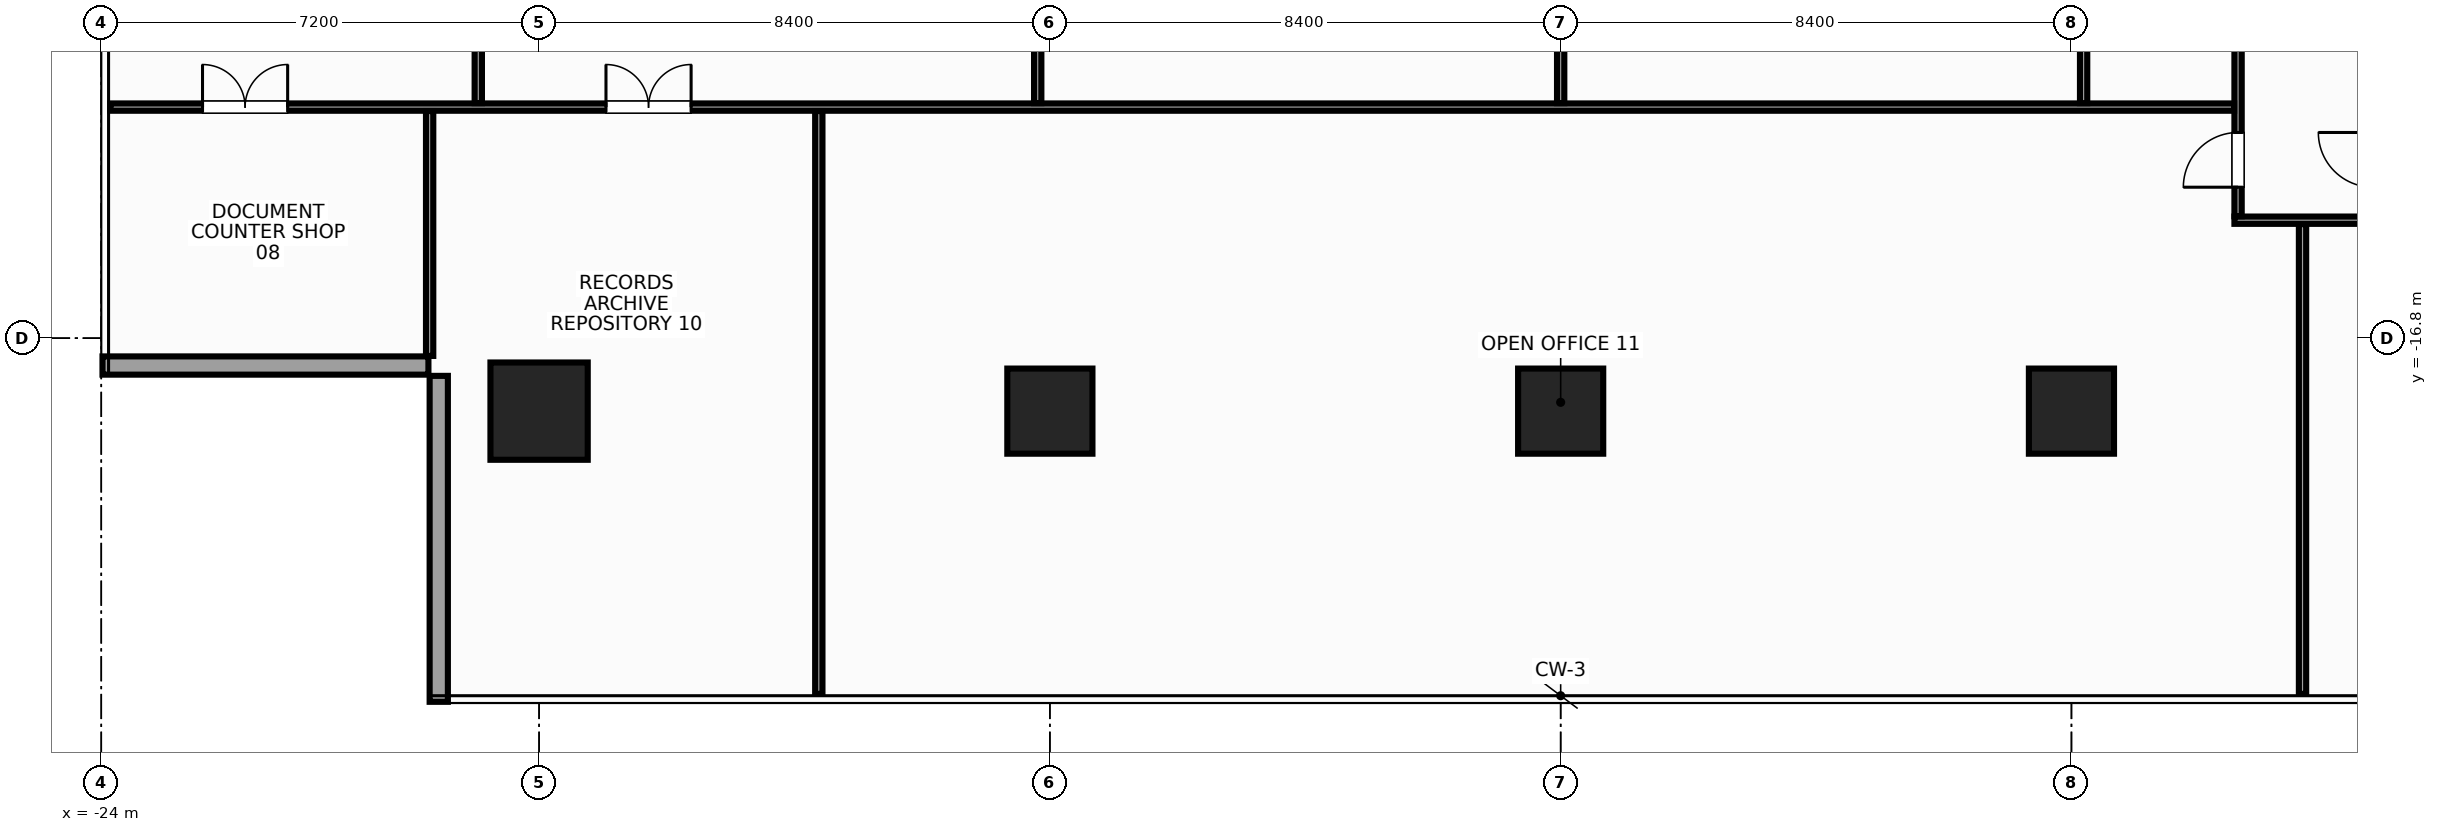
"""IFC4 building model, lengths in metres.
Left out: names, types, materials, properties, quantities, classifications, styles, units other than length and angle.
Written with IfcOpenShell. Run it as: python <this file> out.ifc"""

import sys

from ifc_helpers import new_model, si_unit, direction, frame, frame_2d, origin, origin_2d, place, context, subcontext, project, spatial, rectangle, extrude, source, transform, mapped, element, fill, save


model = new_model("IFC4")
c1 = context("Model", 3, precision=1e-05, world=origin(), true_north=direction((0.0, 1.0)))
c2 = subcontext(c1, "Body", "Model", "MODEL_VIEW")
j1 = project(units=[si_unit("LENGTHUNIT", "METRE"), si_unit("PLANEANGLEUNIT", "RADIAN")], contexts=[c1])
p1 = place(None, origin())
s1 = spatial("IfcSite", under=j1, at=p1, CompositionType="ELEMENT")
p2 = place(p1, origin())
s2 = spatial("IfcBuilding", under=s1, at=p2, CompositionType="ELEMENT")
p3 = place(p2, frame((0.0, 0.0, 185.6)))
s3 = spatial("IfcBuildingStorey", under=s2, at=p3, CompositionType="ELEMENT", Elevation=185.6)
m1 = source(origin(), c2, "Body", "SweptSolid", [
    extrude(rectangle(XDim=1.6, YDim=1.6, at=origin_2d()), origin(), (0.0, 0.0, 1.0), 3.6),
])
p4 = place(p3, frame((-16.8, -18.0, 0.0), z_axis=(0.0, 0.0, 1.0), x_axis=(1.0, 0.0, 0.0)))
e1 = element("IfcColumn", 1, at=p4, inside=s3, PredefinedType="COLUMN", context=c2, shape_type="MappedRepresentation", body=[
    mapped(m1, transform((0.0, 0.0, 0.0), x_axis=(1.0, 0.0, 0.0), y_axis=(0.0, 1.0, 0.0), z_axis=(0.0, 0.0, 1.0), scale=1.0)),
])
m2 = source(origin(), c2, "Body", "SweptSolid", [
    extrude(rectangle(XDim=1.4, YDim=1.4, at=origin_2d()), origin(), (0.0, 0.0, 1.0), 3.6),
])
for number, where, z_axis, x_axis in (
    (2, (-8.4, -18.0, 0.0), (0.0, 0.0, 1.0), (1.0, 0.0, 0.0)),
    (3, (8.4, -18.0, 0.0), (0.0, 0.0, 1.0), (1.0, 0.0, 0.0)),
    (4, (0.0, -18.0, 0.0), (0.0, 0.0, 1.0), (1.0, 0.0, 0.0)),
):
    element("IfcColumn", number, at=place(p3, frame(where, z_axis=z_axis, x_axis=x_axis)), inside=s3, PredefinedType="COLUMN", context=c2, shape_type="MappedRepresentation", body=[
        mapped(m2, transform((0.0, 0.0, 0.0), x_axis=(1.0, 0.0, 0.0), y_axis=(0.0, 1.0, 0.0), z_axis=(0.0, 0.0, 1.0), scale=1.0)),
    ])
m3 = source(origin(), c2, "Body", "SweptSolid", [
    extrude(rectangle(XDim=5.36, YDim=0.3, at=frame_2d((2.68, 0.0))), origin(), (0.0, 0.0, 1.0), 2.68),
])
p5 = place(p3, frame((-23.98, -17.25, 0.0), z_axis=(0.0, 0.0, 1.0), x_axis=(1.0, 0.0, 0.0)))
e5 = element("IfcWall", 5, at=p5, inside=s3, PredefinedType="STANDARD", context=c2, shape_type="MappedRepresentation", body=[
    mapped(m3, transform((0.0, 0.0, 0.0), x_axis=(1.0, 0.0, 0.0), y_axis=(0.0, 1.0, 0.0), z_axis=(0.0, 0.0, 1.0), scale=1.0)),
])
m4 = source(origin(), c2, "Body", "SweptSolid", [
    extrude(rectangle(XDim=5.36, YDim=0.3, at=frame_2d((2.68, 0.0))), origin(), (0.0, 0.0, 1.0), 2.68),
])
p6 = place(p3, frame((-18.45, -17.42, 0.0), z_axis=(0.0, 0.0, 1.0), x_axis=(0.0, -1.0, 0.0)))
e6 = element("IfcWall", 6, at=p6, inside=s3, PredefinedType="STANDARD", context=c2, shape_type="MappedRepresentation", body=[
    mapped(m4, transform((0.0, 0.0, 0.0), x_axis=(1.0, 0.0, 0.0), y_axis=(0.0, 1.0, 0.0), z_axis=(0.0, 0.0, 1.0), scale=1.0)),
])
m5 = source(origin(), c2, "Body", "SweptSolid", [
    extrude(rectangle(XDim=2.34, YDim=0.12, at=frame_2d((1.17, 0.0))), origin(), (0.0, 0.0, 1.0), 3.3),
])
p7 = place(p3, frame((11.08, -14.86, 0.0), z_axis=(0.0, 0.0, 1.0), x_axis=(1.0, 0.0, 0.0)))
e7 = element("IfcWall", 7, at=p7, inside=s3, PredefinedType="PARTITIONING", context=c2, shape_type="MappedRepresentation", body=[
    mapped(m5, transform((0.0, 0.0, 0.0), x_axis=(1.0, 0.0, 0.0), y_axis=(0.0, 1.0, 0.0), z_axis=(0.0, 0.0, 1.0), scale=1.0)),
])
m6 = source(origin(), c2, "Body", "SweptSolid", [
    extrude(rectangle(XDim=22.595, YDim=0.12, at=frame_2d((11.297, 0.0))), origin(), (0.0, 0.0, 1.0), 2.585),
])
p8 = place(p3, frame((11.14, -14.795, 0.0), z_axis=(0.0, 0.0, 1.0), x_axis=(0.0, 1.0, 0.0)))
e8 = element("IfcWall", 8, at=p8, inside=s3, PredefinedType="PARTITIONING", context=c2, shape_type="MappedRepresentation", body=[
    mapped(m6, transform((0.0, 0.0, 0.0), x_axis=(1.0, 0.0, 0.0), y_axis=(0.0, 1.0, 0.0), z_axis=(0.0, 0.0, 1.0), scale=1.0)),
])
p9 = place(p8, frame((0.478, 0.0, 0.0)))
e9 = element("IfcOpeningElement", 9, at=p9, cuts=e8, PredefinedType="OPENING", context=c2, shape_type="SweptSolid", body=[
    extrude(rectangle(XDim=0.9, YDim=2.15, at=frame_2d((0.45, 1.075))), frame((0.0, 0.072, 0.0), z_axis=(0.0, -1.0, 0.0), x_axis=(1.0, 0.0, 0.0)), (0.0, 0.0, 1.0), 0.144),
])
m7 = source(origin(), c2, "Body", "SweptSolid", [
    extrude(rectangle(XDim=34.925, YDim=0.12, at=frame_2d((17.462, 0.0))), origin(), (0.0, 0.0, 1.0), 2.885),
])
p10 = place(p3, frame((-23.85, -13.0, 0.0), z_axis=(0.0, 0.0, 1.0), x_axis=(1.0, 0.0, 0.0)))
e10 = element("IfcWall", 10, at=p10, inside=s3, PredefinedType="PARTITIONING", context=c2, shape_type="MappedRepresentation", body=[
    mapped(m7, transform((0.0, 0.0, 0.0), x_axis=(1.0, 0.0, 0.0), y_axis=(0.0, 1.0, 0.0), z_axis=(0.0, 0.0, 1.0), scale=1.0)),
])
p11 = place(p10, frame((1.515, 0.0, 0.0)))
e11 = element("IfcOpeningElement", 11, at=p11, cuts=e10, PredefinedType="OPENING", context=c2, shape_type="SweptSolid", body=[
    extrude(rectangle(XDim=1.4, YDim=2.2, at=frame_2d((0.7, 1.1))), frame((0.0, 0.072, 0.0), z_axis=(0.0, -1.0, 0.0), x_axis=(1.0, 0.0, 0.0)), (0.0, 0.0, 1.0), 0.144),
])
p12 = place(p10, frame((8.15, 0.0, 0.0)))
e12 = element("IfcOpeningElement", 12, at=p12, cuts=e10, PredefinedType="OPENING", context=c2, shape_type="SweptSolid", body=[
    extrude(rectangle(XDim=1.4, YDim=2.2, at=frame_2d((0.7, 1.1))), frame((0.0, 0.072, 0.0), z_axis=(0.0, -1.0, 0.0), x_axis=(1.0, 0.0, 0.0)), (0.0, 0.0, 1.0), 0.144),
])
m8 = source(origin(), c2, "Body", "SweptSolid", [
    extrude(rectangle(XDim=20.61, YDim=0.12, at=frame_2d((10.305, 0.0))), origin(), (0.0, 0.0, 1.0), 2.835),
])
p13 = place(p3, frame((-17.8, -12.935, 0.0), z_axis=(0.0, 0.0, 1.0), x_axis=(0.0, 1.0, 0.0)))
e13 = element("IfcWall", 13, at=p13, inside=s3, PredefinedType="PARTITIONING", context=c2, shape_type="MappedRepresentation", body=[
    mapped(m8, transform((0.0, 0.0, 0.0), x_axis=(1.0, 0.0, 0.0), y_axis=(0.0, 1.0, 0.0), z_axis=(0.0, 0.0, 1.0), scale=1.0)),
])
m9 = source(origin(), c2, "Body", "SweptSolid", [
    extrude(rectangle(XDim=1.625, YDim=0.12, at=frame_2d((0.812, 0.0))), origin(), (0.0, 0.0, 1.0), 2.885),
])
for number, where, z_axis, x_axis in (
    (14, (-8.6, -12.935, 0.0), (0.0, 0.0, 1.0), (0.0, 1.0, 0.0)),
    (15, (0.0, -12.935, 0.0), (0.0, 0.0, 1.0), (0.0, 1.0, 0.0)),
    (16, (8.6, -12.935, 0.0), (0.0, 0.0, 1.0), (0.0, 1.0, 0.0)),
):
    element("IfcWall", number, at=place(p3, frame(where, z_axis=z_axis, x_axis=x_axis)), inside=s3, PredefinedType="PARTITIONING", context=c2, shape_type="MappedRepresentation", body=[
        mapped(m9, transform((0.0, 0.0, 0.0), x_axis=(1.0, 0.0, 0.0), y_axis=(0.0, 1.0, 0.0), z_axis=(0.0, 0.0, 1.0), scale=1.0)),
    ])
m10 = source(origin(), c2, "Body", "SweptSolid", [
    extrude(rectangle(XDim=4.027, YDim=0.12, at=frame_2d((2.014, 0.0))), origin(), (0.0, 0.0, 1.0), 3.3),
])
p14 = place(p3, frame((-18.6, -17.092, 0.0), z_axis=(0.0, 0.0, 1.0), x_axis=(0.0, 1.0, 0.0)))
e17 = element("IfcWall", 17, at=p14, inside=s3, PredefinedType="PARTITIONING", context=c2, shape_type="MappedRepresentation", body=[
    mapped(m10, transform((0.0, 0.0, 0.0), x_axis=(1.0, 0.0, 0.0), y_axis=(0.0, 1.0, 0.0), z_axis=(0.0, 0.0, 1.0), scale=1.0)),
])
m11 = source(origin(), c2, "Body", "SweptSolid", [
    extrude(rectangle(XDim=9.585, YDim=0.12, at=frame_2d((4.792, 0.0))), origin(), (0.0, 0.0, 1.0), 2.835),
])
p15 = place(p3, frame((-12.2, -22.65, 0.0), z_axis=(0.0, 0.0, 1.0), x_axis=(0.0, 1.0, 0.0)))
e18 = element("IfcWall", 18, at=p15, inside=s3, PredefinedType="PARTITIONING", context=c2, shape_type="MappedRepresentation", body=[
    mapped(m11, transform((0.0, 0.0, 0.0), x_axis=(1.0, 0.0, 0.0), y_axis=(0.0, 1.0, 0.0), z_axis=(0.0, 0.0, 1.0), scale=1.0)),
])
m12 = source(origin(), c2, "Body", "SweptSolid", [
    extrude(rectangle(XDim=7.725, YDim=0.12, at=frame_2d((3.862, 0.0))), origin(), (0.0, 0.0, 1.0), 2.835),
])
p16 = place(p3, frame((12.2, -22.65, 0.0), z_axis=(0.0, 0.0, 1.0), x_axis=(0.0, 1.0, 0.0)))
e19 = element("IfcWall", 19, at=p16, inside=s3, PredefinedType="PARTITIONING", context=c2, shape_type="MappedRepresentation", body=[
    mapped(m12, transform((0.0, 0.0, 0.0), x_axis=(1.0, 0.0, 0.0), y_axis=(0.0, 1.0, 0.0), z_axis=(0.0, 0.0, 1.0), scale=1.0)),
])
m13 = source(origin(), c2, "Body", "SweptSolid", [
    extrude(rectangle(XDim=0.9, YDim=2.15, at=frame_2d((0.45, 1.075))), frame((0.0, 0.025, 0.0), z_axis=(0.0, -1.0, 0.0), x_axis=(1.0, 0.0, 0.0)), (0.0, 0.0, 1.0), 0.05),
])
p17 = place(p9, origin())
e20 = element("IfcDoor", 20, at=p17, inside=s3, OperationType="SINGLE_SWING_LEFT", PredefinedType="DOOR", context=c2, shape_type="MappedRepresentation", body=[
    mapped(m13, transform((0.0, 0.0, 0.0), x_axis=(1.0, 0.0, 0.0), y_axis=(0.0, 1.0, 0.0), z_axis=(0.0, 0.0, 1.0), scale=1.0)),
])
fill(e9, e20)
m14 = source(origin(), c2, "Body", "SweptSolid", [
    extrude(rectangle(XDim=1.4, YDim=2.2, at=frame_2d((0.7, 1.1))), frame((0.0, 0.025, 0.0), z_axis=(0.0, -1.0, 0.0), x_axis=(1.0, 0.0, 0.0)), (0.0, 0.0, 1.0), 0.05),
])
p18 = place(p11, origin())
e21 = element("IfcDoor", 21, at=p18, inside=s3, OperationType="DOUBLE_DOOR_SINGLE_SWING", PredefinedType="DOOR", context=c2, shape_type="MappedRepresentation", body=[
    mapped(m14, transform((0.0, 0.0, 0.0), x_axis=(1.0, 0.0, 0.0), y_axis=(0.0, 1.0, 0.0), z_axis=(0.0, 0.0, 1.0), scale=1.0)),
])
fill(e11, e21)
p19 = place(p12, origin())
e22 = element("IfcDoor", 22, at=p19, inside=s3, OperationType="DOUBLE_DOOR_SINGLE_SWING", PredefinedType="DOOR", context=c2, shape_type="MappedRepresentation", body=[
    mapped(m14, transform((0.0, 0.0, 0.0), x_axis=(1.0, 0.0, 0.0), y_axis=(0.0, 1.0, 0.0), z_axis=(0.0, 0.0, 1.0), scale=1.0)),
])
fill(e12, e22)
save(model, sys.argv[1])
